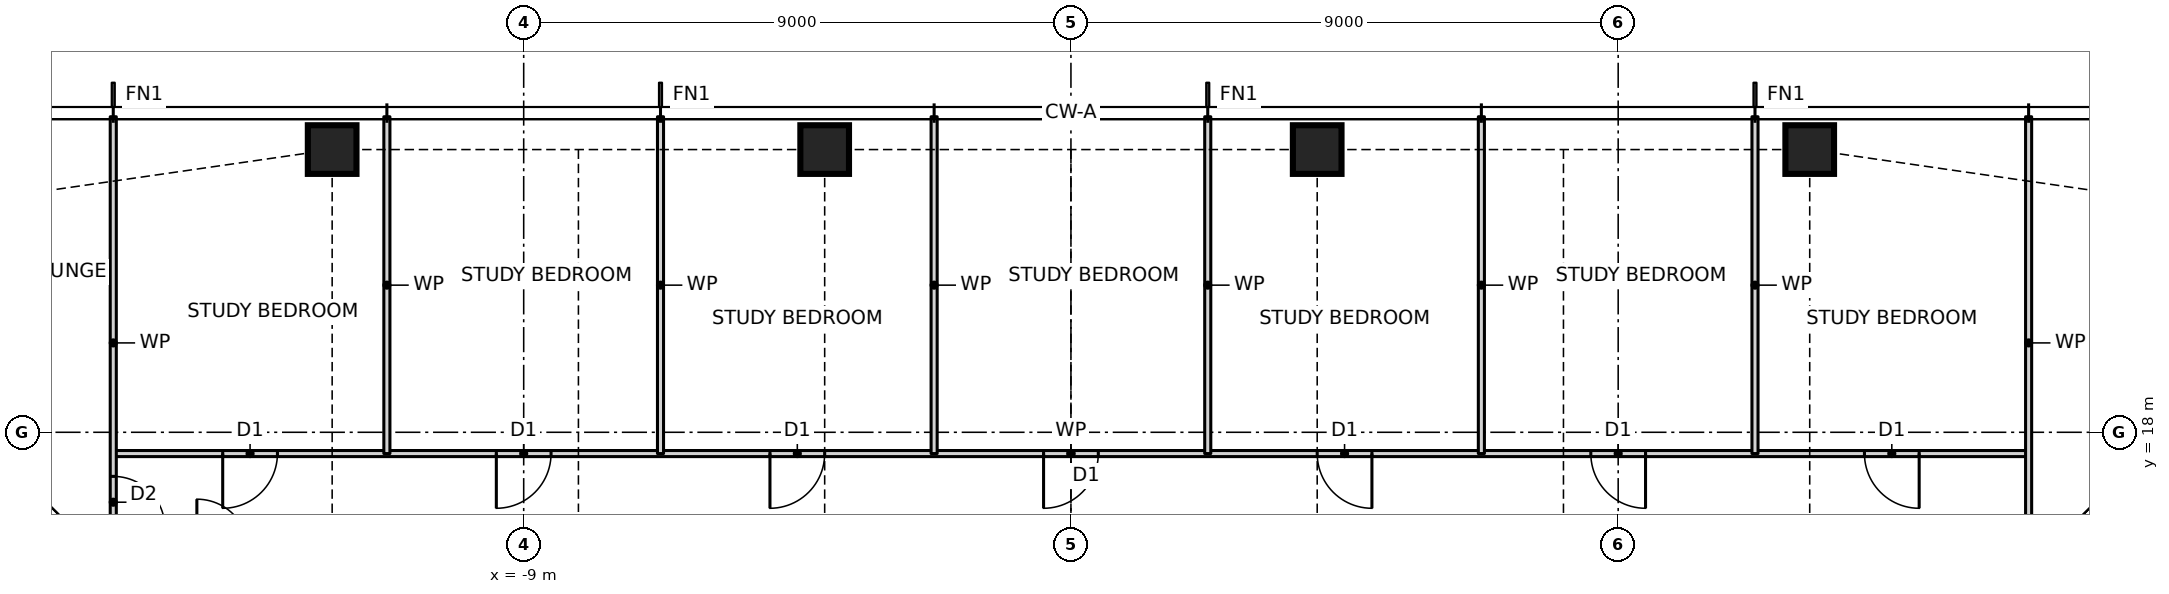
"""IFC4 building model, lengths in metres.
Left out: names, types, materials, properties, quantities, classifications, styles, units other than length and angle.
Written with IfcOpenShell. Run it as: python <this file> out.ifc"""

import sys

from ifc_helpers import new_model, si_unit, direction, frame, frame_2d, origin, origin_2d, place, context, subcontext, project, spatial, rectangle, hollow_rectangle, extrude, element, fill, save


model = new_model("IFC4")
c1 = context("Model", 3, precision=1e-05, world=origin(), true_north=direction((0.0, 1.0)))
c2 = subcontext(c1, "Body", "Model", "MODEL_VIEW")
j1 = project(units=[si_unit("LENGTHUNIT", "METRE"), si_unit("PLANEANGLEUNIT", "RADIAN")], contexts=[c1])
p1 = place(None, origin())
s1 = spatial("IfcSite", under=j1, at=p1, CompositionType="ELEMENT")
p2 = place(p1, origin())
s2 = spatial("IfcBuilding", under=s1, at=p2, CompositionType="ELEMENT")
p3 = place(p2, frame((0.0, 0.0, 18.5)))
s3 = spatial("IfcBuildingStorey", under=s2, at=p3, CompositionType="ELEMENT", Elevation=18.5)
for number, where, z_axis, x_axis in (
    (1, (12.15, 22.65, 0.0), (0.0, 0.0, 1.0), (1.0, 0.0, 0.0)),
    (2, (4.05, 22.65, 0.0), (0.0, 0.0, 1.0), (1.0, 0.0, 0.0)),
    (3, (-4.05, 22.65, 0.0), (0.0, 0.0, 1.0), (1.0, 0.0, 0.0)),
    (4, (-12.15, 22.65, 0.0), (0.0, 0.0, 1.0), (1.0, 0.0, 0.0)),
):
    element("IfcColumn", number, at=place(p3, frame(where, z_axis=z_axis, x_axis=x_axis)), inside=s3, PredefinedType="COLUMN", context=c2, shape_type="SweptSolid", body=[
        extrude(hollow_rectangle(XDim=0.8, YDim=0.8, WallThickness=0.09, at=origin_2d()), origin(), (0.0, 0.0, 1.0), 3.5),
    ])
p4 = place(p3, frame((-15.75, 17.65, 0.0), z_axis=(0.0, 0.0, 1.0), x_axis=(1.0, 0.0, 0.0)))
e5 = element("IfcWall", 5, at=p4, inside=s3, PredefinedType="PARTITIONING", context=c2, shape_type="SweptSolid", body=[
    extrude(rectangle(XDim=31.5, YDim=0.1, at=frame_2d((15.75, 0.0))), origin(), (0.0, 0.0, 1.0), 3.27),
])
p5 = place(p4, frame((28.8, 0.0, 0.0)))
e6 = element("IfcOpeningElement", 6, at=p5, cuts=e5, PredefinedType="OPENING", context=c2, shape_type="SweptSolid", body=[
    extrude(rectangle(XDim=0.9, YDim=2.1, at=frame_2d((0.45, 1.05))), frame((0.0, 0.06, 0.0), z_axis=(0.0, -1.0, 0.0), x_axis=(1.0, 0.0, 0.0)), (0.0, 0.0, 1.0), 0.12),
])
p6 = place(p4, frame((24.3, 0.0, 0.0)))
e7 = element("IfcOpeningElement", 7, at=p6, cuts=e5, PredefinedType="OPENING", context=c2, shape_type="SweptSolid", body=[
    extrude(rectangle(XDim=0.9, YDim=2.1, at=frame_2d((0.45, 1.05))), frame((0.0, 0.06, 0.0), z_axis=(0.0, -1.0, 0.0), x_axis=(1.0, 0.0, 0.0)), (0.0, 0.0, 1.0), 0.12),
])
p7 = place(p4, frame((19.8, 0.0, 0.0)))
e8 = element("IfcOpeningElement", 8, at=p7, cuts=e5, PredefinedType="OPENING", context=c2, shape_type="SweptSolid", body=[
    extrude(rectangle(XDim=0.9, YDim=2.1, at=frame_2d((0.45, 1.05))), frame((0.0, 0.06, 0.0), z_axis=(0.0, -1.0, 0.0), x_axis=(1.0, 0.0, 0.0)), (0.0, 0.0, 1.0), 0.12),
])
p8 = place(p4, frame((15.3, 0.0, 0.0)))
e9 = element("IfcOpeningElement", 9, at=p8, cuts=e5, PredefinedType="OPENING", context=c2, shape_type="SweptSolid", body=[
    extrude(rectangle(XDim=0.9, YDim=2.1, at=frame_2d((0.45, 1.05))), frame((0.0, 0.06, 0.0), z_axis=(0.0, -1.0, 0.0), x_axis=(1.0, 0.0, 0.0)), (0.0, 0.0, 1.0), 0.12),
])
p9 = place(p4, frame((10.8, 0.0, 0.0)))
e10 = element("IfcOpeningElement", 10, at=p9, cuts=e5, PredefinedType="OPENING", context=c2, shape_type="SweptSolid", body=[
    extrude(rectangle(XDim=0.9, YDim=2.1, at=frame_2d((0.45, 1.05))), frame((0.0, 0.06, 0.0), z_axis=(0.0, -1.0, 0.0), x_axis=(1.0, 0.0, 0.0)), (0.0, 0.0, 1.0), 0.12),
])
p10 = place(p4, frame((6.3, 0.0, 0.0)))
e11 = element("IfcOpeningElement", 11, at=p10, cuts=e5, PredefinedType="OPENING", context=c2, shape_type="SweptSolid", body=[
    extrude(rectangle(XDim=0.9, YDim=2.1, at=frame_2d((0.45, 1.05))), frame((0.0, 0.06, 0.0), z_axis=(0.0, -1.0, 0.0), x_axis=(1.0, 0.0, 0.0)), (0.0, 0.0, 1.0), 0.12),
])
p11 = place(p4, frame((1.8, 0.0, 0.0)))
e12 = element("IfcOpeningElement", 12, at=p11, cuts=e5, PredefinedType="OPENING", context=c2, shape_type="SweptSolid", body=[
    extrude(rectangle(XDim=0.9, YDim=2.1, at=frame_2d((0.45, 1.05))), frame((0.0, 0.06, 0.0), z_axis=(0.0, -1.0, 0.0), x_axis=(1.0, 0.0, 0.0)), (0.0, 0.0, 1.0), 0.12),
])
p12 = place(p3, frame((15.75, 15.75, 0.0), z_axis=(0.0, 0.0, 1.0), x_axis=(0.0, 1.0, 0.0)))
e13 = element("IfcWall", 13, at=p12, inside=s3, PredefinedType="PARTITIONING", context=c2, shape_type="SweptSolid", body=[
    extrude(rectangle(XDim=7.44, YDim=0.1, at=frame_2d((3.72, 0.0))), origin(), (0.0, 0.0, 1.0), 3.27),
])
for number, where, z_axis, x_axis in (
    (14, (11.25, 17.65, 0.0), (0.0, 0.0, 1.0), (0.0, 1.0, 0.0)),
    (15, (6.75, 17.65, 0.0), (0.0, 0.0, 1.0), (0.0, 1.0, 0.0)),
    (16, (2.25, 17.65, 0.0), (0.0, 0.0, 1.0), (0.0, 1.0, 0.0)),
    (17, (-2.25, 17.65, 0.0), (0.0, 0.0, 1.0), (0.0, 1.0, 0.0)),
    (18, (-6.75, 17.65, 0.0), (0.0, 0.0, 1.0), (0.0, 1.0, 0.0)),
    (19, (-11.25, 17.65, 0.0), (0.0, 0.0, 1.0), (0.0, 1.0, 0.0)),
):
    element("IfcWall", number, at=place(p3, frame(where, z_axis=z_axis, x_axis=x_axis)), inside=s3, PredefinedType="PARTITIONING", context=c2, shape_type="SweptSolid", body=[
        extrude(rectangle(XDim=5.54, YDim=0.1, at=frame_2d((2.77, 0.0))), origin(), (0.0, 0.0, 1.0), 3.27),
    ])
p13 = place(p3, frame((-15.75, 15.75, 0.0), z_axis=(0.0, 0.0, 1.0), x_axis=(0.0, 1.0, 0.0)))
e20 = element("IfcWall", 20, at=p13, inside=s3, PredefinedType="PARTITIONING", context=c2, shape_type="SweptSolid", body=[
    extrude(rectangle(XDim=7.44, YDim=0.1, at=frame_2d((3.72, 0.0))), origin(), (0.0, 0.0, 1.0), 3.27),
])
p14 = place(p13, frame((0.675, 0.0, 0.0)))
e21 = element("IfcOpeningElement", 21, at=p14, cuts=e20, PredefinedType="OPENING", context=c2, shape_type="SweptSolid", body=[
    extrude(rectangle(XDim=0.85, YDim=2.1, at=frame_2d((0.425, 1.05))), frame((0.0, 0.06, 0.0), z_axis=(0.0, -1.0, 0.0), x_axis=(1.0, 0.0, 0.0)), (0.0, 0.0, 1.0), 0.12),
])
p15 = place(p5, frame((0.9, 0.0, 0.0), z_axis=(0.0, 0.0, 1.0), x_axis=(-1.0, 0.0, 0.0)))
e22 = element("IfcDoor", 22, at=p15, inside=s3, OperationType="SINGLE_SWING_LEFT", PredefinedType="DOOR", context=c2, shape_type="SweptSolid", body=[
    extrude(rectangle(XDim=0.9, YDim=2.1, at=frame_2d((0.45, 1.05))), frame((0.0, 0.025, 0.0), z_axis=(0.0, -1.0, 0.0), x_axis=(1.0, 0.0, 0.0)), (0.0, 0.0, 1.0), 0.05),
])
fill(e6, e22)
p16 = place(p6, frame((0.9, 0.0, 0.0), z_axis=(0.0, 0.0, 1.0), x_axis=(-1.0, 0.0, 0.0)))
e23 = element("IfcDoor", 23, at=p16, inside=s3, OperationType="SINGLE_SWING_LEFT", PredefinedType="DOOR", context=c2, shape_type="SweptSolid", body=[
    extrude(rectangle(XDim=0.9, YDim=2.1, at=frame_2d((0.45, 1.05))), frame((0.0, 0.025, 0.0), z_axis=(0.0, -1.0, 0.0), x_axis=(1.0, 0.0, 0.0)), (0.0, 0.0, 1.0), 0.05),
])
fill(e7, e23)
p17 = place(p7, frame((0.9, 0.0, 0.0), z_axis=(0.0, 0.0, 1.0), x_axis=(-1.0, 0.0, 0.0)))
e24 = element("IfcDoor", 24, at=p17, inside=s3, OperationType="SINGLE_SWING_LEFT", PredefinedType="DOOR", context=c2, shape_type="SweptSolid", body=[
    extrude(rectangle(XDim=0.9, YDim=2.1, at=frame_2d((0.45, 1.05))), frame((0.0, 0.025, 0.0), z_axis=(0.0, -1.0, 0.0), x_axis=(1.0, 0.0, 0.0)), (0.0, 0.0, 1.0), 0.05),
])
fill(e8, e24)
p18 = place(p8, frame((0.9, 0.0, 0.0), z_axis=(0.0, 0.0, 1.0), x_axis=(-1.0, 0.0, 0.0)))
e25 = element("IfcDoor", 25, at=p18, inside=s3, OperationType="SINGLE_SWING_RIGHT", PredefinedType="DOOR", context=c2, shape_type="SweptSolid", body=[
    extrude(rectangle(XDim=0.9, YDim=2.1, at=frame_2d((0.45, 1.05))), frame((0.0, 0.025, 0.0), z_axis=(0.0, -1.0, 0.0), x_axis=(1.0, 0.0, 0.0)), (0.0, 0.0, 1.0), 0.05),
])
fill(e9, e25)
p19 = place(p9, frame((0.9, 0.0, 0.0), z_axis=(0.0, 0.0, 1.0), x_axis=(-1.0, 0.0, 0.0)))
e26 = element("IfcDoor", 26, at=p19, inside=s3, OperationType="SINGLE_SWING_RIGHT", PredefinedType="DOOR", context=c2, shape_type="SweptSolid", body=[
    extrude(rectangle(XDim=0.9, YDim=2.1, at=frame_2d((0.45, 1.05))), frame((0.0, 0.025, 0.0), z_axis=(0.0, -1.0, 0.0), x_axis=(1.0, 0.0, 0.0)), (0.0, 0.0, 1.0), 0.05),
])
fill(e10, e26)
p20 = place(p10, frame((0.9, 0.0, 0.0), z_axis=(0.0, 0.0, 1.0), x_axis=(-1.0, 0.0, 0.0)))
e27 = element("IfcDoor", 27, at=p20, inside=s3, OperationType="SINGLE_SWING_RIGHT", PredefinedType="DOOR", context=c2, shape_type="SweptSolid", body=[
    extrude(rectangle(XDim=0.9, YDim=2.1, at=frame_2d((0.45, 1.05))), frame((0.0, 0.025, 0.0), z_axis=(0.0, -1.0, 0.0), x_axis=(1.0, 0.0, 0.0)), (0.0, 0.0, 1.0), 0.05),
])
fill(e11, e27)
p21 = place(p11, frame((0.9, 0.0, 0.0), z_axis=(0.0, 0.0, 1.0), x_axis=(-1.0, 0.0, 0.0)))
e28 = element("IfcDoor", 28, at=p21, inside=s3, OperationType="SINGLE_SWING_RIGHT", PredefinedType="DOOR", context=c2, shape_type="SweptSolid", body=[
    extrude(rectangle(XDim=0.9, YDim=2.1, at=frame_2d((0.45, 1.05))), frame((0.0, 0.025, 0.0), z_axis=(0.0, -1.0, 0.0), x_axis=(1.0, 0.0, 0.0)), (0.0, 0.0, 1.0), 0.05),
])
fill(e12, e28)
p22 = place(p14, frame((0.85, 0.0, 0.0), z_axis=(0.0, 0.0, 1.0), x_axis=(-1.0, 0.0, 0.0)))
e29 = element("IfcDoor", 29, at=p22, inside=s3, OperationType="SINGLE_SWING_RIGHT", PredefinedType="DOOR", context=c2, shape_type="SweptSolid", body=[
    extrude(rectangle(XDim=0.85, YDim=2.1, at=frame_2d((0.425, 1.05))), frame((0.0, 0.025, 0.0), z_axis=(0.0, -1.0, 0.0), x_axis=(1.0, 0.0, 0.0)), (0.0, 0.0, 1.0), 0.05),
])
fill(e21, e29)
save(model, sys.argv[1])
